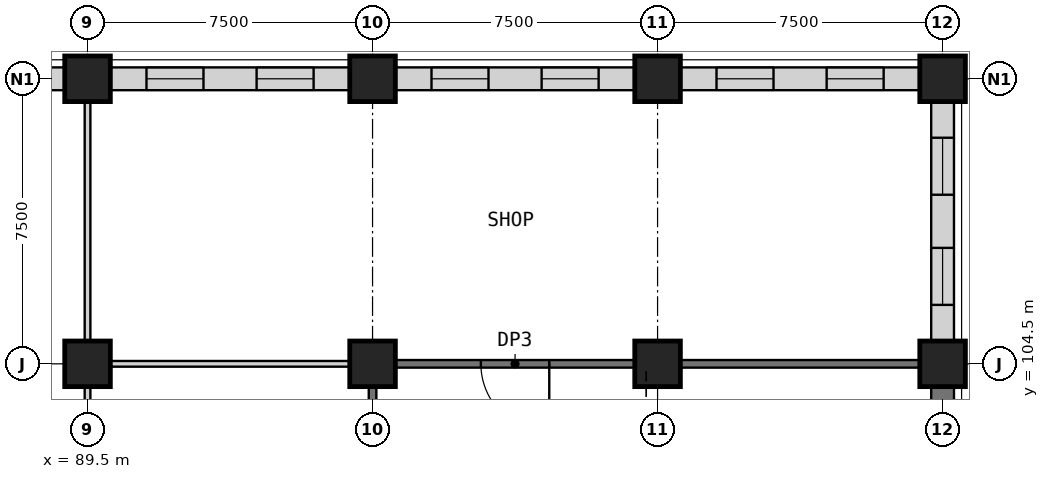
"""IFC4 building model, lengths in metres.
Left out: names, types, materials, properties, quantities, classifications, styles, units other than length and angle.
Written with IfcOpenShell. Run it as: python <this file> out.ifc"""

import sys

from ifc_helpers import new_model, si_unit, direction, frame, frame_2d, origin, origin_2d, place, context, subcontext, project, spatial, rectangle, extrude, element, fill, save


model = new_model("IFC4")
c1 = context("Model", 3, precision=1e-05, world=origin(), true_north=direction((0.0, 1.0)))
c2 = subcontext(c1, "Body", "Model", "MODEL_VIEW")
j1 = project(units=[si_unit("LENGTHUNIT", "METRE"), si_unit("PLANEANGLEUNIT", "RADIAN")], contexts=[c1])
p1 = place(None, origin())
s1 = spatial("IfcSite", under=j1, at=p1, CompositionType="ELEMENT")
p2 = place(p1, origin())
s2 = spatial("IfcBuilding", under=s1, at=p2, CompositionType="ELEMENT")
p3 = place(p2, frame((0.0, 0.0, 8.0)))
s3 = spatial("IfcBuildingStorey", under=s2, at=p3, CompositionType="ELEMENT", Elevation=8.0)
for number, where, z_axis, x_axis in (
    (1, (89.5, 104.5, 0.0), (0.0, 0.0, 1.0), (1.0, 0.0, 0.0)),
    (2, (89.5, 112.0, 0.0), (0.0, 0.0, 1.0), (1.0, 0.0, 0.0)),
    (3, (97.0, 104.5, 0.0), (0.0, 0.0, 1.0), (1.0, 0.0, 0.0)),
    (4, (97.0, 112.0, 0.0), (0.0, 0.0, 1.0), (1.0, 0.0, 0.0)),
    (5, (104.5, 104.5, 0.0), (0.0, 0.0, 1.0), (1.0, 0.0, 0.0)),
    (6, (104.5, 112.0, 0.0), (0.0, 0.0, 1.0), (1.0, 0.0, 0.0)),
    (7, (112.0, 104.5, 0.0), (0.0, 0.0, 1.0), (1.0, 0.0, 0.0)),
    (8, (112.0, 112.0, 0.0), (0.0, 0.0, 1.0), (1.0, 0.0, 0.0)),
):
    element("IfcColumn", number, at=place(p3, frame(where, z_axis=z_axis, x_axis=x_axis)), inside=s3, PredefinedType="COLUMN", context=c2, shape_type="SweptSolid", body=[
        extrude(rectangle(XDim=1.2, YDim=1.2, at=origin_2d()), origin(), (0.0, 0.0, 1.0), 5.5),
    ])
p4 = place(p3, frame((82.6, 112.0, 0.0), z_axis=(0.0, 0.0, 1.0), x_axis=(1.0, 0.0, 0.0)))
e9 = element("IfcWall", 9, at=p4, inside=s3, PredefinedType="PARTITIONING", context=c2, shape_type="SweptSolid", body=[
    extrude(rectangle(XDim=6.3, YDim=0.6, at=frame_2d((3.15, 0.0))), origin(), (0.0, 0.0, 1.0), 4.6),
])
p5 = place(p4, frame((0.951, 0.0, 0.9)))
e10 = element("IfcOpeningElement", 10, at=p5, cuts=e9, PredefinedType="OPENING", context=c2, shape_type="SweptSolid", body=[
    extrude(rectangle(XDim=1.5, YDim=2.8, at=frame_2d((0.75, 1.4))), frame((0.0, 0.31, 0.0), z_axis=(0.0, -1.0, 0.0), x_axis=(1.0, 0.0, 0.0)), (0.0, 0.0, 1.0), 0.62),
])
p6 = place(p4, frame((3.849, 0.0, 0.9)))
e11 = element("IfcOpeningElement", 11, at=p6, cuts=e9, PredefinedType="OPENING", context=c2, shape_type="SweptSolid", body=[
    extrude(rectangle(XDim=1.5, YDim=2.8, at=frame_2d((0.75, 1.4))), frame((0.0, 0.31, 0.0), z_axis=(0.0, -1.0, 0.0), x_axis=(1.0, 0.0, 0.0)), (0.0, 0.0, 1.0), 0.62),
])
p7 = place(p3, frame((90.1, 112.0, 0.0), z_axis=(0.0, 0.0, 1.0), x_axis=(1.0, 0.0, 0.0)))
e12 = element("IfcWall", 12, at=p7, inside=s3, PredefinedType="PARTITIONING", context=c2, shape_type="SweptSolid", body=[
    extrude(rectangle(XDim=6.3, YDim=0.6, at=frame_2d((3.15, 0.0))), origin(), (0.0, 0.0, 1.0), 4.6),
])
p8 = place(p7, frame((0.951, 0.0, 0.9)))
e13 = element("IfcOpeningElement", 13, at=p8, cuts=e12, PredefinedType="OPENING", context=c2, shape_type="SweptSolid", body=[
    extrude(rectangle(XDim=1.5, YDim=2.8, at=frame_2d((0.75, 1.4))), frame((0.0, 0.31, 0.0), z_axis=(0.0, -1.0, 0.0), x_axis=(1.0, 0.0, 0.0)), (0.0, 0.0, 1.0), 0.62),
])
p9 = place(p7, frame((3.849, 0.0, 0.9)))
e14 = element("IfcOpeningElement", 14, at=p9, cuts=e12, PredefinedType="OPENING", context=c2, shape_type="SweptSolid", body=[
    extrude(rectangle(XDim=1.5, YDim=2.8, at=frame_2d((0.75, 1.4))), frame((0.0, 0.31, 0.0), z_axis=(0.0, -1.0, 0.0), x_axis=(1.0, 0.0, 0.0)), (0.0, 0.0, 1.0), 0.62),
])
p10 = place(p3, frame((97.6, 112.0, 0.0), z_axis=(0.0, 0.0, 1.0), x_axis=(1.0, 0.0, 0.0)))
e15 = element("IfcWall", 15, at=p10, inside=s3, PredefinedType="PARTITIONING", context=c2, shape_type="SweptSolid", body=[
    extrude(rectangle(XDim=6.3, YDim=0.6, at=frame_2d((3.15, 0.0))), origin(), (0.0, 0.0, 1.0), 4.6),
])
p11 = place(p10, frame((0.951, 0.0, 0.9)))
e16 = element("IfcOpeningElement", 16, at=p11, cuts=e15, PredefinedType="OPENING", context=c2, shape_type="SweptSolid", body=[
    extrude(rectangle(XDim=1.5, YDim=2.8, at=frame_2d((0.75, 1.4))), frame((0.0, 0.31, 0.0), z_axis=(0.0, -1.0, 0.0), x_axis=(1.0, 0.0, 0.0)), (0.0, 0.0, 1.0), 0.62),
])
p12 = place(p10, frame((3.849, 0.0, 0.9)))
e17 = element("IfcOpeningElement", 17, at=p12, cuts=e15, PredefinedType="OPENING", context=c2, shape_type="SweptSolid", body=[
    extrude(rectangle(XDim=1.5, YDim=2.8, at=frame_2d((0.75, 1.4))), frame((0.0, 0.31, 0.0), z_axis=(0.0, -1.0, 0.0), x_axis=(1.0, 0.0, 0.0)), (0.0, 0.0, 1.0), 0.62),
])
p13 = place(p3, frame((105.1, 112.0, 0.0), z_axis=(0.0, 0.0, 1.0), x_axis=(1.0, 0.0, 0.0)))
e18 = element("IfcWall", 18, at=p13, inside=s3, PredefinedType="PARTITIONING", context=c2, shape_type="SweptSolid", body=[
    extrude(rectangle(XDim=6.3, YDim=0.6, at=frame_2d((3.15, 0.0))), origin(), (0.0, 0.0, 1.0), 4.6),
])
p14 = place(p13, frame((0.951, 0.0, 0.9)))
e19 = element("IfcOpeningElement", 19, at=p14, cuts=e18, PredefinedType="OPENING", context=c2, shape_type="SweptSolid", body=[
    extrude(rectangle(XDim=1.5, YDim=2.8, at=frame_2d((0.75, 1.4))), frame((0.0, 0.31, 0.0), z_axis=(0.0, -1.0, 0.0), x_axis=(1.0, 0.0, 0.0)), (0.0, 0.0, 1.0), 0.62),
])
p15 = place(p13, frame((3.849, 0.0, 0.9)))
e20 = element("IfcOpeningElement", 20, at=p15, cuts=e18, PredefinedType="OPENING", context=c2, shape_type="SweptSolid", body=[
    extrude(rectangle(XDim=1.5, YDim=2.8, at=frame_2d((0.75, 1.4))), frame((0.0, 0.31, 0.0), z_axis=(0.0, -1.0, 0.0), x_axis=(1.0, 0.0, 0.0)), (0.0, 0.0, 1.0), 0.62),
])
p16 = place(p3, frame((90.1, 104.5, 0.0), z_axis=(0.0, 0.0, 1.0), x_axis=(1.0, 0.0, 0.0)))
e21 = element("IfcWall", 21, at=p16, inside=s3, PredefinedType="PARTITIONING", context=c2, shape_type="SweptSolid", body=[
    extrude(rectangle(XDim=6.3, YDim=0.15, at=frame_2d((3.15, 0.0))), origin(), (0.0, 0.0, 1.0), 5.2),
])
p17 = place(p3, frame((103.9, 104.5, 0.0), z_axis=(0.0, 0.0, 1.0), x_axis=(-1.0, 0.0, 0.0)))
e22 = element("IfcWall", 22, at=p17, inside=s3, PredefinedType="SHEAR", context=c2, shape_type="SweptSolid", body=[
    extrude(rectangle(XDim=6.3, YDim=0.2, at=frame_2d((3.15, 0.0))), origin(), (0.0, 0.0, 1.0), 5.2),
])
p18 = place(p17, frame((2.25, 0.0, 0.0)))
e23 = element("IfcOpeningElement", 23, at=p18, cuts=e22, PredefinedType="OPENING", context=c2, shape_type="SweptSolid", body=[
    extrude(rectangle(XDim=1.8, YDim=2.4, at=frame_2d((0.9, 1.2))), frame((0.0, 0.11, 0.0), z_axis=(0.0, -1.0, 0.0), x_axis=(1.0, 0.0, 0.0)), (0.0, 0.0, 1.0), 0.22),
])
p19 = place(p3, frame((105.1, 104.5, 0.0), z_axis=(0.0, 0.0, 1.0), x_axis=(1.0, 0.0, 0.0)))
e24 = element("IfcWall", 24, at=p19, inside=s3, PredefinedType="SHEAR", context=c2, shape_type="SweptSolid", body=[
    extrude(rectangle(XDim=6.3, YDim=0.2, at=frame_2d((3.15, 0.0))), origin(), (0.0, 0.0, 1.0), 5.2),
])
p20 = place(p3, frame((97.0, 103.9, 0.0), z_axis=(0.0, 0.0, 1.0), x_axis=(0.0, -1.0, 0.0)))
e25 = element("IfcWall", 25, at=p20, inside=s3, PredefinedType="SHEAR", context=c2, shape_type="SweptSolid", body=[
    extrude(rectangle(XDim=6.3, YDim=0.2, at=frame_2d((3.15, 0.0))), origin(), (0.0, 0.0, 1.0), 5.2),
])
p21 = place(p20, frame((2.6, 0.0, 0.0)))
e26 = element("IfcOpeningElement", 26, at=p21, cuts=e25, PredefinedType="OPENING", context=c2, shape_type="SweptSolid", body=[
    extrude(rectangle(XDim=1.2, YDim=2.1, at=frame_2d((0.6, 1.05))), frame((0.0, 0.11, 0.0), z_axis=(0.0, -1.0, 0.0), x_axis=(1.0, 0.0, 0.0)), (0.0, 0.0, 1.0), 0.22),
])
p22 = place(p3, frame((112.0, 97.6, 0.0), z_axis=(0.0, 0.0, 1.0), x_axis=(0.0, 1.0, 0.0)))
e27 = element("IfcWall", 27, at=p22, inside=s3, PredefinedType="PARTITIONING", context=c2, shape_type="SweptSolid", body=[
    extrude(rectangle(XDim=6.3, YDim=0.6, at=frame_2d((3.15, 0.0))), origin(), (0.0, 0.0, 1.0), 4.6),
])
p23 = place(p3, frame((112.0, 105.1, 0.0), z_axis=(0.0, 0.0, 1.0), x_axis=(0.0, 1.0, 0.0)))
e28 = element("IfcWall", 28, at=p23, inside=s3, PredefinedType="PARTITIONING", context=c2, shape_type="SweptSolid", body=[
    extrude(rectangle(XDim=6.3, YDim=0.6, at=frame_2d((3.15, 0.0))), origin(), (0.0, 0.0, 1.0), 4.6),
])
p24 = place(p23, frame((0.951, 0.0, 0.9)))
e29 = element("IfcOpeningElement", 29, at=p24, cuts=e28, PredefinedType="OPENING", context=c2, shape_type="SweptSolid", body=[
    extrude(rectangle(XDim=1.5, YDim=2.8, at=frame_2d((0.75, 1.4))), frame((0.0, 0.31, 0.0), z_axis=(0.0, -1.0, 0.0), x_axis=(1.0, 0.0, 0.0)), (0.0, 0.0, 1.0), 0.62),
])
p25 = place(p23, frame((3.849, 0.0, 0.9)))
e30 = element("IfcOpeningElement", 30, at=p25, cuts=e28, PredefinedType="OPENING", context=c2, shape_type="SweptSolid", body=[
    extrude(rectangle(XDim=1.5, YDim=2.8, at=frame_2d((0.75, 1.4))), frame((0.0, 0.31, 0.0), z_axis=(0.0, -1.0, 0.0), x_axis=(1.0, 0.0, 0.0)), (0.0, 0.0, 1.0), 0.62),
])
p26 = place(p3, frame((89.5, 97.5, 0.0), z_axis=(0.0, 0.0, 1.0), x_axis=(0.0, 1.0, 0.0)))
e31 = element("IfcWall", 31, at=p26, inside=s3, PredefinedType="PARTITIONING", context=c2, shape_type="SweptSolid", body=[
    extrude(rectangle(XDim=6.4, YDim=0.15, at=frame_2d((3.2, 0.0))), origin(), (0.0, 0.0, 1.0), 5.2),
])
p27 = place(p3, frame((89.5, 105.1, 0.0), z_axis=(0.0, 0.0, 1.0), x_axis=(0.0, 1.0, 0.0)))
e32 = element("IfcWall", 32, at=p27, inside=s3, PredefinedType="PARTITIONING", context=c2, shape_type="SweptSolid", body=[
    extrude(rectangle(XDim=6.3, YDim=0.15, at=frame_2d((3.15, 0.0))), origin(), (0.0, 0.0, 1.0), 5.2),
])
p28 = place(p8, origin())
e33 = element("IfcWindow", 33, at=p28, inside=s3, PartitioningType="SINGLE_PANEL", PredefinedType="WINDOW", context=c2, shape_type="SweptSolid", body=[
    extrude(rectangle(XDim=1.5, YDim=2.8, at=frame_2d((0.75, 1.4))), frame((0.0, 0.03, 0.0), z_axis=(0.0, -1.0, 0.0), x_axis=(1.0, 0.0, 0.0)), (0.0, 0.0, 1.0), 0.06),
])
fill(e13, e33)
p29 = place(p9, origin())
e34 = element("IfcWindow", 34, at=p29, inside=s3, PartitioningType="SINGLE_PANEL", PredefinedType="WINDOW", context=c2, shape_type="SweptSolid", body=[
    extrude(rectangle(XDim=1.5, YDim=2.8, at=frame_2d((0.75, 1.4))), frame((0.0, 0.03, 0.0), z_axis=(0.0, -1.0, 0.0), x_axis=(1.0, 0.0, 0.0)), (0.0, 0.0, 1.0), 0.06),
])
fill(e14, e34)
p30 = place(p11, origin())
e35 = element("IfcWindow", 35, at=p30, inside=s3, PartitioningType="SINGLE_PANEL", PredefinedType="WINDOW", context=c2, shape_type="SweptSolid", body=[
    extrude(rectangle(XDim=1.5, YDim=2.8, at=frame_2d((0.75, 1.4))), frame((0.0, 0.03, 0.0), z_axis=(0.0, -1.0, 0.0), x_axis=(1.0, 0.0, 0.0)), (0.0, 0.0, 1.0), 0.06),
])
fill(e16, e35)
p31 = place(p12, origin())
e36 = element("IfcWindow", 36, at=p31, inside=s3, PartitioningType="SINGLE_PANEL", PredefinedType="WINDOW", context=c2, shape_type="SweptSolid", body=[
    extrude(rectangle(XDim=1.5, YDim=2.8, at=frame_2d((0.75, 1.4))), frame((0.0, 0.03, 0.0), z_axis=(0.0, -1.0, 0.0), x_axis=(1.0, 0.0, 0.0)), (0.0, 0.0, 1.0), 0.06),
])
fill(e17, e36)
p32 = place(p14, origin())
e37 = element("IfcWindow", 37, at=p32, inside=s3, PartitioningType="SINGLE_PANEL", PredefinedType="WINDOW", context=c2, shape_type="SweptSolid", body=[
    extrude(rectangle(XDim=1.5, YDim=2.8, at=frame_2d((0.75, 1.4))), frame((0.0, 0.03, 0.0), z_axis=(0.0, -1.0, 0.0), x_axis=(1.0, 0.0, 0.0)), (0.0, 0.0, 1.0), 0.06),
])
fill(e19, e37)
p33 = place(p15, origin())
e38 = element("IfcWindow", 38, at=p33, inside=s3, PartitioningType="SINGLE_PANEL", PredefinedType="WINDOW", context=c2, shape_type="SweptSolid", body=[
    extrude(rectangle(XDim=1.5, YDim=2.8, at=frame_2d((0.75, 1.4))), frame((0.0, 0.03, 0.0), z_axis=(0.0, -1.0, 0.0), x_axis=(1.0, 0.0, 0.0)), (0.0, 0.0, 1.0), 0.06),
])
fill(e20, e38)
p34 = place(p18, origin())
e39 = element("IfcDoor", 39, at=p34, inside=s3, OperationType="SINGLE_SWING_LEFT", PredefinedType="DOOR", context=c2, shape_type="SweptSolid", body=[
    extrude(rectangle(XDim=1.8, YDim=2.4, at=frame_2d((0.9, 1.2))), frame((0.0, 0.025, 0.0), z_axis=(0.0, -1.0, 0.0), x_axis=(1.0, 0.0, 0.0)), (0.0, 0.0, 1.0), 0.05),
])
fill(e23, e39)
p35 = place(p24, origin())
e40 = element("IfcWindow", 40, at=p35, inside=s3, PartitioningType="SINGLE_PANEL", PredefinedType="WINDOW", context=c2, shape_type="SweptSolid", body=[
    extrude(rectangle(XDim=1.5, YDim=2.8, at=frame_2d((0.75, 1.4))), frame((0.0, 0.03, 0.0), z_axis=(0.0, -1.0, 0.0), x_axis=(1.0, 0.0, 0.0)), (0.0, 0.0, 1.0), 0.06),
])
fill(e29, e40)
p36 = place(p25, origin())
e41 = element("IfcWindow", 41, at=p36, inside=s3, PartitioningType="SINGLE_PANEL", PredefinedType="WINDOW", context=c2, shape_type="SweptSolid", body=[
    extrude(rectangle(XDim=1.5, YDim=2.8, at=frame_2d((0.75, 1.4))), frame((0.0, 0.03, 0.0), z_axis=(0.0, -1.0, 0.0), x_axis=(1.0, 0.0, 0.0)), (0.0, 0.0, 1.0), 0.06),
])
fill(e30, e41)
save(model, sys.argv[1])
